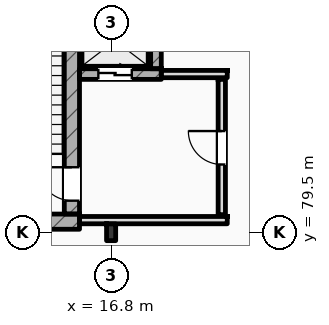
"""IFC4 building model, lengths in metres.
Left out: names, types, materials, properties, quantities, classifications, styles, units other than length and angle.
Written with IfcOpenShell. Run it as: python <this file> out.ifc"""

import sys

from ifc_helpers import new_model, si_unit, direction, frame, frame_2d, origin, origin_2d, place, context, subcontext, project, spatial, rectangle, i_section, extrude, element, fill, save


model = new_model("IFC4")
c1 = context("Model", 3, precision=1e-05, world=origin(), true_north=direction((0.0, 1.0)))
c2 = subcontext(c1, "Body", "Model", "MODEL_VIEW")
j1 = project(units=[si_unit("LENGTHUNIT", "METRE"), si_unit("PLANEANGLEUNIT", "RADIAN")], contexts=[c1])
p1 = place(None, origin())
s1 = spatial("IfcSite", under=j1, at=p1, CompositionType="ELEMENT")
p2 = place(p1, origin())
s2 = spatial("IfcBuilding", under=s1, at=p2, CompositionType="ELEMENT")
p3 = place(p2, frame((0.0, 0.0, 11.4)))
s3 = spatial("IfcBuildingStorey", under=s2, at=p3, CompositionType="ELEMENT", Elevation=11.4)
p4 = place(p3, frame((16.8, 79.5, 0.0), z_axis=(0.0, 0.0, 1.0), x_axis=(1.0, 0.0, 0.0)))
e1 = element("IfcColumn", 1, at=p4, inside=s3, PredefinedType="COLUMN", context=c2, shape_type="SweptSolid", body=[
    extrude(i_section(OverallWidth=0.3, OverallDepth=0.55, WebThickness=0.015, FlangeThickness=0.029, FilletRadius=0.027, at=origin_2d()), origin(), (0.0, 0.0, 1.0), 4.8),
])
p5 = place(p3, frame((10.6, 79.85, 0.0), z_axis=(0.0, 0.0, 1.0), x_axis=(1.0, 0.0, 0.0)))
e2 = element("IfcWall", 2, at=p5, inside=s3, PredefinedType="SHEAR", context=c2, shape_type="SweptSolid", body=[
    extrude(rectangle(XDim=5.16, YDim=0.5, at=frame_2d((2.58, 0.0))), origin(), (0.0, 0.0, 1.0), 4.8),
])
p6 = place(p3, frame((15.51, 80.1, 0.0), z_axis=(0.0, 0.0, 1.0), x_axis=(0.0, 1.0, 0.0)))
e3 = element("IfcWall", 3, at=p6, inside=s3, PredefinedType="SHEAR", context=c2, shape_type="SweptSolid", body=[
    extrude(rectangle(XDim=9.112, YDim=0.5, at=frame_2d((4.556, 0.0))), origin(), (0.0, 0.0, 1.0), 4.8),
])
p7 = place(p6, frame((0.44, 0.0, 0.0)))
e4 = element("IfcOpeningElement", 4, at=p7, cuts=e3, PredefinedType="OPENING", context=c2, shape_type="SweptSolid", body=[
    extrude(rectangle(XDim=1.1, YDim=2.2, at=frame_2d((0.55, 1.1))), frame((0.0, 0.26, 0.0), z_axis=(0.0, -1.0, 0.0), x_axis=(1.0, 0.0, 0.0)), (0.0, 0.0, 1.0), 0.52),
])
p8 = place(p3, frame((15.76, 84.705, 0.0), z_axis=(0.0, 0.0, 1.0), x_axis=(1.0, 0.0, 0.0)))
e5 = element("IfcWall", 5, at=p8, inside=s3, PredefinedType="SHEAR", context=c2, shape_type="SweptSolid", body=[
    extrude(rectangle(XDim=2.69, YDim=0.35, at=frame_2d((1.345, 0.0))), origin(), (0.0, 0.0, 1.0), 4.52),
])
p9 = place(p8, frame((0.62, 0.0, 0.0)))
e6 = element("IfcOpeningElement", 6, at=p9, cuts=e5, PredefinedType="OPENING", context=c2, shape_type="SweptSolid", body=[
    extrude(rectangle(XDim=1.1, YDim=2.2, at=frame_2d((0.55, 1.1))), frame((0.0, 0.185, 0.0), z_axis=(0.0, -1.0, 0.0), x_axis=(1.0, 0.0, 0.0)), (0.0, 0.0, 1.0), 0.37),
])
p10 = place(p3, frame((18.275, 84.88, 0.0), z_axis=(0.0, 0.0, 1.0), x_axis=(0.0, 1.0, 0.0)))
e7 = element("IfcWall", 7, at=p10, inside=s3, PredefinedType="SHEAR", context=c2, shape_type="SweptSolid", body=[
    extrude(rectangle(XDim=1.84, YDim=0.35, at=frame_2d((0.92, 0.0))), origin(), (0.0, 0.0, 1.0), 4.52),
])
p11 = place(p3, frame((15.76, 79.9, 0.0), z_axis=(0.0, 0.0, 1.0), x_axis=(1.0, 0.0, 0.0)))
e8 = element("IfcWall", 8, at=p11, inside=s3, PredefinedType="STANDARD", context=c2, shape_type="SweptSolid", body=[
    extrude(rectangle(XDim=4.86, YDim=0.24, at=frame_2d((2.43, 0.0))), origin(), (0.0, 0.0, 1.0), 4.52),
])
p12 = place(p3, frame((18.45, 84.705, 0.0), z_axis=(0.0, 0.0, 1.0), x_axis=(1.0, 0.0, 0.0)))
e9 = element("IfcWall", 9, at=p12, inside=s3, PredefinedType="STANDARD", context=c2, shape_type="SweptSolid", body=[
    extrude(rectangle(XDim=2.17, YDim=0.24, at=frame_2d((1.085, 0.0))), origin(), (0.0, 0.0, 1.0), 4.52),
])
p13 = place(p3, frame((20.44, 80.08, 0.0), z_axis=(0.0, 0.0, 1.0), x_axis=(0.0, 1.0, 0.0)))
e10 = element("IfcWall", 10, at=p13, inside=s3, PredefinedType="STANDARD", context=c2, shape_type="SweptSolid", body=[
    extrude(rectangle(XDim=4.45, YDim=0.24, at=frame_2d((2.225, 0.0))), origin(), (0.0, 0.0, 1.0), 4.52),
])
p14 = place(p13, frame((1.65, 0.0, 0.0)))
e11 = element("IfcOpeningElement", 11, at=p14, cuts=e10, PredefinedType="OPENING", context=c2, shape_type="SweptSolid", body=[
    extrude(rectangle(XDim=1.1, YDim=2.2, at=frame_2d((0.55, 1.1))), frame((0.0, 0.13, 0.0), z_axis=(0.0, -1.0, 0.0), x_axis=(1.0, 0.0, 0.0)), (0.0, 0.0, 1.0), 0.26),
])
p15 = place(p7, origin())
e12 = element("IfcDoor", 12, at=p15, inside=s3, OperationType="SINGLE_SWING_RIGHT", PredefinedType="DOOR", context=c2, shape_type="SweptSolid", body=[
    extrude(rectangle(XDim=1.1, YDim=2.2, at=frame_2d((0.55, 1.1))), frame((0.0, 0.025, 0.0), z_axis=(0.0, -1.0, 0.0), x_axis=(1.0, 0.0, 0.0)), (0.0, 0.0, 1.0), 0.05),
])
fill(e4, e12)
p16 = place(p9, origin())
e13 = element("IfcDoor", 13, at=p16, inside=s3, OperationType="SLIDING_TO_LEFT", PredefinedType="DOOR", context=c2, shape_type="SweptSolid", body=[
    extrude(rectangle(XDim=1.1, YDim=2.2, at=frame_2d((0.55, 1.1))), frame((0.0, 0.025, 0.0), z_axis=(0.0, -1.0, 0.0), x_axis=(1.0, 0.0, 0.0)), (0.0, 0.0, 1.0), 0.05),
])
fill(e6, e13)
p17 = place(p14, origin())
e14 = element("IfcDoor", 14, at=p17, inside=s3, OperationType="SINGLE_SWING_RIGHT", PredefinedType="DOOR", context=c2, shape_type="SweptSolid", body=[
    extrude(rectangle(XDim=1.1, YDim=2.2, at=frame_2d((0.55, 1.1))), frame((0.0, 0.025, 0.0), z_axis=(0.0, -1.0, 0.0), x_axis=(1.0, 0.0, 0.0)), (0.0, 0.0, 1.0), 0.05),
])
fill(e11, e14)
save(model, sys.argv[1])
